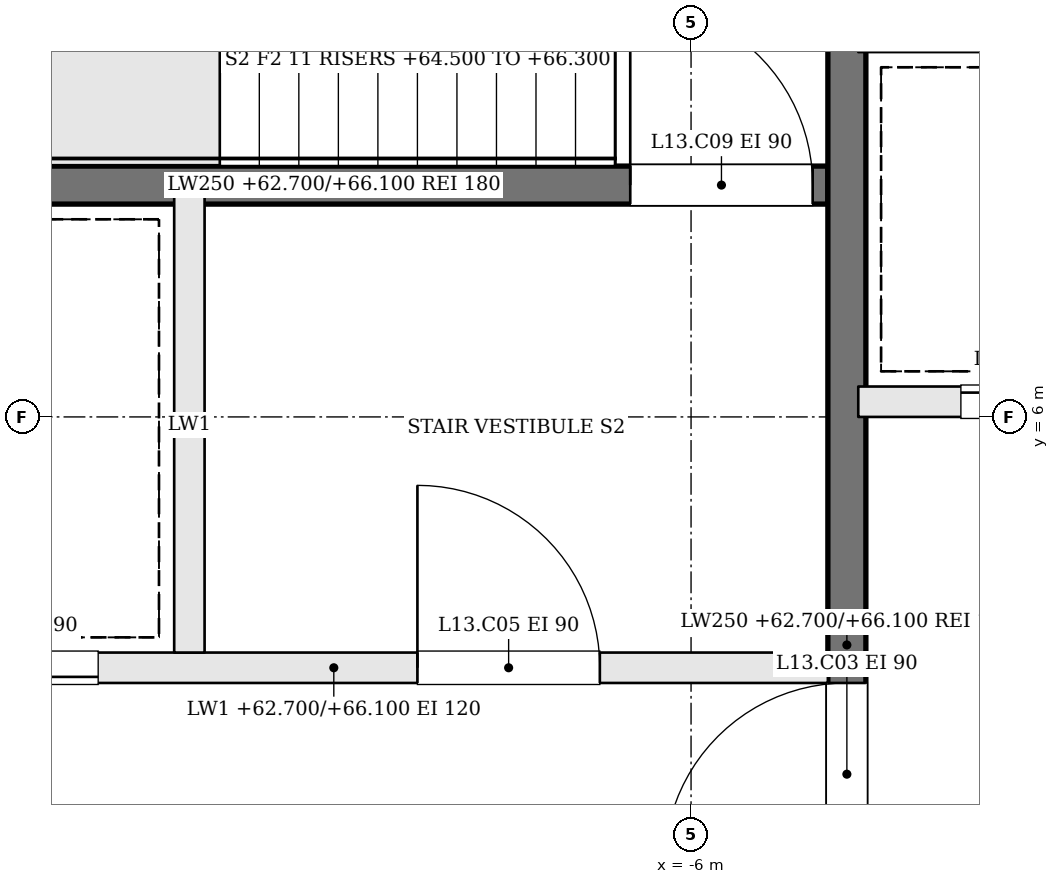
"""IFC4 building model, lengths in metres.
Left out: names, types, materials, properties, quantities, classifications, styles, units other than length and angle.
Written with IfcOpenShell. Run it as: python <this file> out.ifc"""

import sys

from ifc_helpers import new_model, si_unit, direction, frame, frame_2d, origin, place, context, subcontext, project, spatial, rectangle, extrude, element, fill, save


model = new_model("IFC4")
c1 = context("Model", 3, precision=1e-05, world=origin(), true_north=direction((0.0, 1.0)))
c2 = subcontext(c1, "Body", "Model", "MODEL_VIEW")
j1 = project(units=[si_unit("LENGTHUNIT", "METRE"), si_unit("PLANEANGLEUNIT", "RADIAN")], contexts=[c1])
p1 = place(None, origin())
s1 = spatial("IfcSite", under=j1, at=p1, CompositionType="ELEMENT")
p2 = place(p1, origin())
s2 = spatial("IfcBuilding", under=s1, at=p2, CompositionType="ELEMENT")
p3 = place(p2, frame((0.0, 0.0, 62.7)))
s3 = spatial("IfcBuildingStorey", under=s2, at=p3, CompositionType="ELEMENT", Elevation=62.7)
p4 = place(p3, frame((-11.6, 4.35, 0.0), z_axis=(0.0, 0.0, 1.0), x_axis=(1.0, 0.0, 0.0)))
e1 = element("IfcWall", 1, at=p4, inside=s3, PredefinedType="SOLIDWALL", context=c2, shape_type="SweptSolid", body=[
    extrude(rectangle(XDim=6.5, YDim=0.2, at=frame_2d((3.25, 0.0))), origin(), (0.0, 0.0, 1.0), 3.4),
])
p5 = place(p4, frame((3.8, 0.0, 0.0)))
e2 = element("IfcOpeningElement", 2, at=p5, cuts=e1, PredefinedType="OPENING", context=c2, shape_type="SweptSolid", body=[
    extrude(rectangle(XDim=1.2, YDim=2.1, at=frame_2d((0.6, 1.05))), frame((0.0, 0.11, 0.0), z_axis=(0.0, -1.0, 0.0), x_axis=(1.0, 0.0, 0.0)), (0.0, 0.0, 1.0), 0.22),
])
p6 = place(p4, frame((0.5, 0.0, 0.0)))
e3 = element("IfcOpeningElement", 3, at=p6, cuts=e1, PredefinedType="OPENING", context=c2, shape_type="SweptSolid", body=[
    extrude(rectangle(XDim=1.2, YDim=2.1, at=frame_2d((0.6, 1.05))), frame((0.0, 0.11, 0.0), z_axis=(0.0, -1.0, 0.0), x_axis=(1.0, 0.0, 0.0)), (0.0, 0.0, 1.0), 0.22),
])
p7 = place(p3, frame((-11.6, 7.525, 0.0), z_axis=(0.0, 0.0, 1.0), x_axis=(1.0, 0.0, 0.0)))
e4 = element("IfcWall", 4, at=p7, inside=s3, PredefinedType="SOLIDWALL", context=c2, shape_type="SweptSolid", body=[
    extrude(rectangle(XDim=6.5, YDim=0.25, at=frame_2d((3.25, 0.0))), origin(), (0.0, 0.0, 1.0), 3.4),
])
p8 = place(p7, frame((5.2, 0.0, 0.0)))
e5 = element("IfcOpeningElement", 5, at=p8, cuts=e4, PredefinedType="OPENING", context=c2, shape_type="SweptSolid", body=[
    extrude(rectangle(XDim=1.2, YDim=2.1, at=frame_2d((0.6, 1.05))), frame((0.0, 0.135, 0.0), z_axis=(0.0, -1.0, 0.0), x_axis=(1.0, 0.0, 0.0)), (0.0, 0.0, 1.0), 0.27),
])
p9 = place(p3, frame((-9.3, 4.45, 0.0), z_axis=(0.0, 0.0, 1.0), x_axis=(0.0, 1.0, 0.0)))
e6 = element("IfcWall", 6, at=p9, inside=s3, PredefinedType="SOLIDWALL", context=c2, shape_type="SweptSolid", body=[
    extrude(rectangle(XDim=3.0, YDim=0.2, at=frame_2d((1.5, 0.0))), origin(), (0.0, 0.0, 1.0), 3.4),
])
p10 = place(p3, frame((-4.975, -1.6, 0.0), z_axis=(0.0, 0.0, 1.0), x_axis=(0.0, 1.0, 0.0)))
e7 = element("IfcWall", 7, at=p10, inside=s3, PredefinedType="SOLIDWALL", context=c2, shape_type="SweptSolid", body=[
    extrude(rectangle(XDim=12.2, YDim=0.25, at=frame_2d((6.1, 0.0))), origin(), (0.0, 0.0, 1.0), 3.4),
])
p11 = place(p10, frame((4.65, 0.0, 0.0)))
e8 = element("IfcOpeningElement", 8, at=p11, cuts=e7, PredefinedType="OPENING", context=c2, shape_type="SweptSolid", body=[
    extrude(rectangle(XDim=1.2, YDim=2.1, at=frame_2d((0.6, 1.05))), frame((0.0, 0.135, 0.0), z_axis=(0.0, -1.0, 0.0), x_axis=(1.0, 0.0, 0.0)), (0.0, 0.0, 1.0), 0.27),
])
p12 = place(p3, frame((-4.9, 6.1, 0.0), z_axis=(0.0, 0.0, 1.0), x_axis=(1.0, 0.0, 0.0)))
e9 = element("IfcWall", 9, at=p12, inside=s3, PredefinedType="SOLIDWALL", context=c2, shape_type="SweptSolid", body=[
    extrude(rectangle(XDim=9.8, YDim=0.2, at=frame_2d((4.9, 0.0))), origin(), (0.0, 0.0, 1.0), 3.4),
])
p13 = place(p12, frame((0.675, 0.0, 0.0)))
e10 = element("IfcOpeningElement", 10, at=p13, cuts=e9, PredefinedType="OPENING", context=c2, shape_type="SweptSolid", body=[
    extrude(rectangle(XDim=1.1, YDim=2.1, at=frame_2d((0.55, 1.05))), frame((0.0, 0.11, 0.0), z_axis=(0.0, -1.0, 0.0), x_axis=(1.0, 0.0, 0.0)), (0.0, 0.0, 1.0), 0.22),
])
p14 = place(p12, frame((3.125, 0.0, 0.0)))
e11 = element("IfcOpeningElement", 11, at=p14, cuts=e9, PredefinedType="OPENING", context=c2, shape_type="SweptSolid", body=[
    extrude(rectangle(XDim=1.1, YDim=2.1, at=frame_2d((0.55, 1.05))), frame((0.0, 0.11, 0.0), z_axis=(0.0, -1.0, 0.0), x_axis=(1.0, 0.0, 0.0)), (0.0, 0.0, 1.0), 0.22),
])
p15 = place(p12, frame((5.575, 0.0, 0.0)))
e12 = element("IfcOpeningElement", 12, at=p15, cuts=e9, PredefinedType="OPENING", context=c2, shape_type="SweptSolid", body=[
    extrude(rectangle(XDim=1.1, YDim=2.1, at=frame_2d((0.55, 1.05))), frame((0.0, 0.11, 0.0), z_axis=(0.0, -1.0, 0.0), x_axis=(1.0, 0.0, 0.0)), (0.0, 0.0, 1.0), 0.22),
])
p16 = place(p12, frame((8.025, 0.0, 0.0)))
e13 = element("IfcOpeningElement", 13, at=p16, cuts=e9, PredefinedType="OPENING", context=c2, shape_type="SweptSolid", body=[
    extrude(rectangle(XDim=1.1, YDim=2.1, at=frame_2d((0.55, 1.05))), frame((0.0, 0.11, 0.0), z_axis=(0.0, -1.0, 0.0), x_axis=(1.0, 0.0, 0.0)), (0.0, 0.0, 1.0), 0.22),
])
p17 = place(p11, origin())
e14 = element("IfcDoor", 14, at=p17, inside=s3, OperationType="SINGLE_SWING_LEFT", PredefinedType="DOOR", context=c2, shape_type="SweptSolid", body=[
    extrude(rectangle(XDim=1.2, YDim=2.1, at=frame_2d((0.6, 1.05))), frame((0.0, 0.025, 0.0), z_axis=(0.0, -1.0, 0.0), x_axis=(1.0, 0.0, 0.0)), (0.0, 0.0, 1.0), 0.05),
])
fill(e8, e14)
p18 = place(p5, origin())
e15 = element("IfcDoor", 15, at=p18, inside=s3, OperationType="SINGLE_SWING_LEFT", PredefinedType="DOOR", context=c2, shape_type="SweptSolid", body=[
    extrude(rectangle(XDim=1.2, YDim=2.1, at=frame_2d((0.6, 1.05))), frame((0.0, 0.025, 0.0), z_axis=(0.0, -1.0, 0.0), x_axis=(1.0, 0.0, 0.0)), (0.0, 0.0, 1.0), 0.05),
])
fill(e2, e15)
p19 = place(p8, origin())
e16 = element("IfcDoor", 16, at=p19, inside=s3, OperationType="SINGLE_SWING_LEFT", PredefinedType="DOOR", context=c2, shape_type="SweptSolid", body=[
    extrude(rectangle(XDim=1.2, YDim=2.1, at=frame_2d((0.6, 1.05))), frame((0.0, 0.025, 0.0), z_axis=(0.0, -1.0, 0.0), x_axis=(1.0, 0.0, 0.0)), (0.0, 0.0, 1.0), 0.05),
])
fill(e5, e16)
p20 = place(p6, origin())
e17 = element("IfcDoor", 17, at=p20, inside=s3, OperationType="SLIDING_TO_RIGHT", PredefinedType="DOOR", context=c2, shape_type="SweptSolid", body=[
    extrude(rectangle(XDim=1.2, YDim=2.1, at=frame_2d((0.6, 1.05))), frame((0.0, 0.025, 0.0), z_axis=(0.0, -1.0, 0.0), x_axis=(1.0, 0.0, 0.0)), (0.0, 0.0, 1.0), 0.05),
])
fill(e3, e17)
p21 = place(p13, origin())
e18 = element("IfcDoor", 18, at=p21, inside=s3, OperationType="SLIDING_TO_RIGHT", PredefinedType="DOOR", context=c2, shape_type="SweptSolid", body=[
    extrude(rectangle(XDim=1.1, YDim=2.1, at=frame_2d((0.55, 1.05))), frame((0.0, 0.025, 0.0), z_axis=(0.0, -1.0, 0.0), x_axis=(1.0, 0.0, 0.0)), (0.0, 0.0, 1.0), 0.05),
])
fill(e10, e18)
save(model, sys.argv[1])
